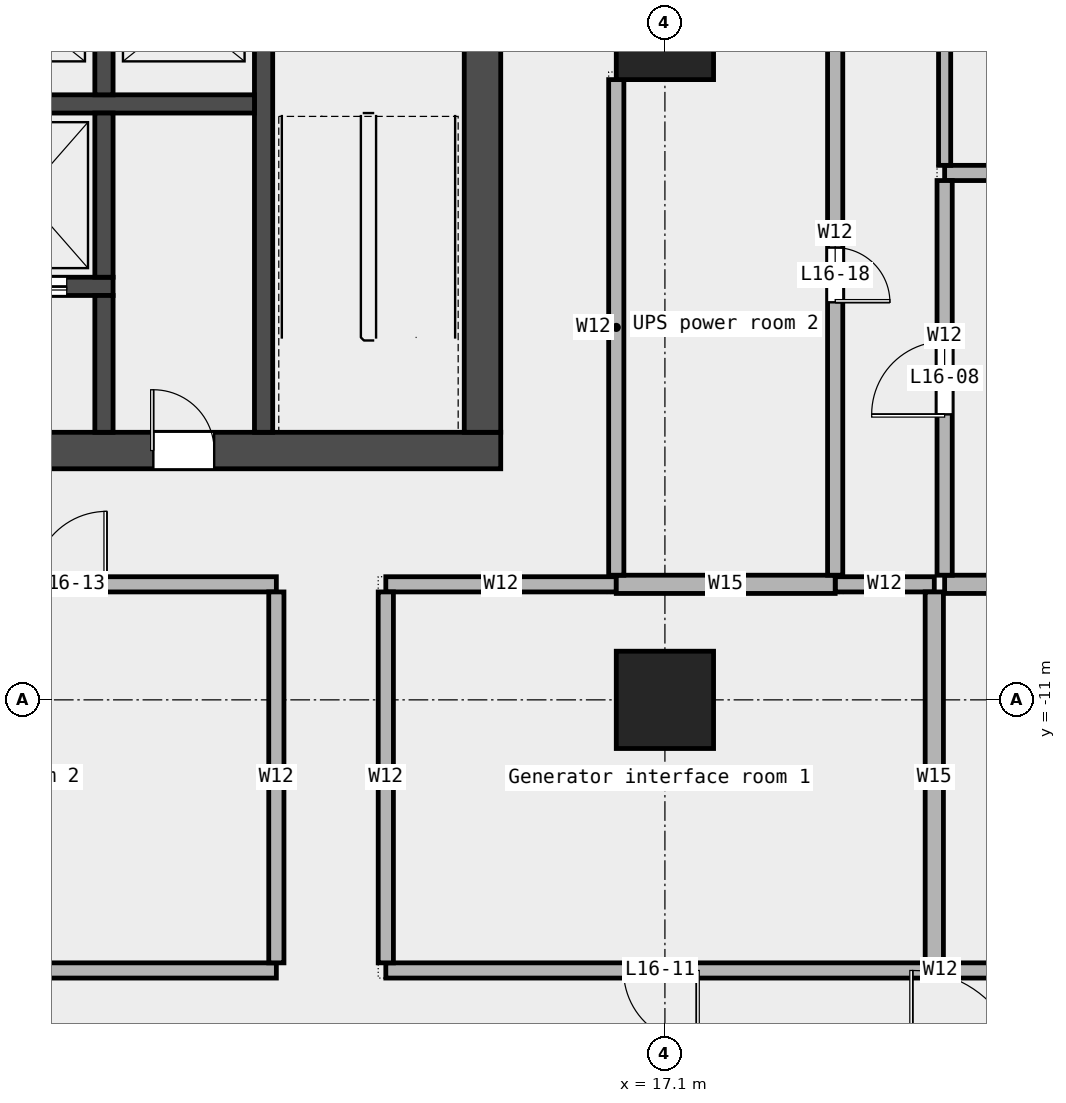
"""IFC4 building model, lengths in metres.
Left out: names, types, materials, properties, quantities, classifications, styles, units other than length and angle.
Written with IfcOpenShell. Run it as: python <this file> out.ifc"""

import sys

from ifc_helpers import new_model, si_unit, direction, frame, frame_2d, origin, origin_2d, place, context, subcontext, project, spatial, rectangle, extrude, element, fill, save


model = new_model("IFC4")
c1 = context("Model", 3, precision=1e-05, world=origin(), true_north=direction((0.0, 1.0)))
c2 = subcontext(c1, "Body", "Model", "MODEL_VIEW")
j1 = project(units=[si_unit("LENGTHUNIT", "METRE"), si_unit("PLANEANGLEUNIT", "RADIAN")], contexts=[c1])
p1 = place(None, origin())
s1 = spatial("IfcSite", under=j1, at=p1, CompositionType="ELEMENT")
p2 = place(p1, origin())
s2 = spatial("IfcBuilding", under=s1, at=p2, CompositionType="ELEMENT")
p3 = place(p2, frame((0.0, 0.0, 83.8)))
s3 = spatial("IfcBuildingStorey", under=s2, at=p3, CompositionType="ELEMENT", Elevation=83.8)
for number, where, z_axis, x_axis in (
    (1, (17.1, -11.0, 0.0), (0.0, 0.0, 1.0), (1.0, 0.0, 0.0)),
    (2, (17.1, 0.0, 0.0), (0.0, 0.0, 1.0), (1.0, 0.0, 0.0)),
):
    element("IfcColumn", number, at=place(p3, frame(where, z_axis=z_axis, x_axis=x_axis)), inside=s3, PredefinedType="COLUMN", context=c2, shape_type="SweptSolid", body=[
        extrude(rectangle(XDim=1.6, YDim=1.6, at=origin_2d()), origin(), (0.0, 0.0, 1.0), 4.2),
    ])
p4 = place(p3, frame((-7.655, -15.45, 0.0), z_axis=(0.0, 0.0, 1.0), x_axis=(1.0, 0.0, 0.0)))
e3 = element("IfcWall", 3, at=p4, inside=s3, PredefinedType="PARTITIONING", context=c2, shape_type="SweptSolid", body=[
    extrude(rectangle(XDim=18.365, YDim=0.25, at=frame_2d((9.183, 0.0))), origin(), (0.0, 0.0, 1.0), 4.2),
])
p5 = place(p3, frame((12.51, -15.45, 0.0), z_axis=(0.0, 0.0, 1.0), x_axis=(1.0, 0.0, 0.0)))
e4 = element("IfcWall", 4, at=p5, inside=s3, PredefinedType="PARTITIONING", context=c2, shape_type="SweptSolid", body=[
    extrude(rectangle(XDim=18.24, YDim=0.25, at=frame_2d((9.12, 0.0))), origin(), (0.0, 0.0, 1.0), 4.2),
])
p6 = place(p5, frame((12.93, 0.0, 0.0)))
e5 = element("IfcOpeningElement", 5, at=p6, cuts=e4, PredefinedType="OPENING", context=c2, shape_type="SweptSolid", body=[
    extrude(rectangle(XDim=1.2, YDim=2.1, at=frame_2d((0.6, 1.05))), frame((0.0, 0.137, 0.0), z_axis=(0.0, -1.0, 0.0), x_axis=(1.0, 0.0, 0.0)), (0.0, 0.0, 1.0), 0.274),
])
p7 = place(p5, frame((3.91, 0.0, 0.0)))
e6 = element("IfcOpeningElement", 6, at=p7, cuts=e4, PredefinedType="OPENING", context=c2, shape_type="SweptSolid", body=[
    extrude(rectangle(XDim=1.2, YDim=2.1, at=frame_2d((0.6, 1.05))), frame((0.0, 0.137, 0.0), z_axis=(0.0, -1.0, 0.0), x_axis=(1.0, 0.0, 0.0)), (0.0, 0.0, 1.0), 0.274),
])
p8 = place(p3, frame((-7.655, -9.1, 0.0), z_axis=(0.0, 0.0, 1.0), x_axis=(1.0, 0.0, 0.0)))
e7 = element("IfcWall", 7, at=p8, inside=s3, PredefinedType="PARTITIONING", context=c2, shape_type="SweptSolid", body=[
    extrude(rectangle(XDim=18.365, YDim=0.25, at=frame_2d((9.183, 0.0))), origin(), (0.0, 0.0, 1.0), 4.2),
])
p9 = place(p8, frame((3.992, 0.0, 0.0)))
e8 = element("IfcOpeningElement", 8, at=p9, cuts=e7, PredefinedType="OPENING", context=c2, shape_type="SweptSolid", body=[
    extrude(rectangle(XDim=1.2, YDim=2.1, at=frame_2d((0.6, 1.05))), frame((0.0, 0.137, 0.0), z_axis=(0.0, -1.0, 0.0), x_axis=(1.0, 0.0, 0.0)), (0.0, 0.0, 1.0), 0.274),
])
p10 = place(p8, frame((14.375, 0.0, 0.0)))
e9 = element("IfcOpeningElement", 9, at=p10, cuts=e7, PredefinedType="OPENING", context=c2, shape_type="SweptSolid", body=[
    extrude(rectangle(XDim=1.2, YDim=2.1, at=frame_2d((0.6, 1.05))), frame((0.0, 0.137, 0.0), z_axis=(0.0, -1.0, 0.0), x_axis=(1.0, 0.0, 0.0)), (0.0, 0.0, 1.0), 0.274),
])
p11 = place(p3, frame((12.51, -9.1, 0.0), z_axis=(0.0, 0.0, 1.0), x_axis=(1.0, 0.0, 0.0)))
e10 = element("IfcWall", 10, at=p11, inside=s3, PredefinedType="PARTITIONING", context=c2, shape_type="SweptSolid", body=[
    extrude(rectangle(XDim=3.79, YDim=0.25, at=frame_2d((1.895, 0.0))), origin(), (0.0, 0.0, 1.0), 4.2),
])
p12 = place(p3, frame((19.9, -9.1, 0.0), z_axis=(0.0, 0.0, 1.0), x_axis=(1.0, 0.0, 0.0)))
e11 = element("IfcWall", 11, at=p12, inside=s3, PredefinedType="PARTITIONING", context=c2, shape_type="SweptSolid", body=[
    extrude(rectangle(XDim=1.63, YDim=0.25, at=frame_2d((0.815, 0.0))), origin(), (0.0, 0.0, 1.0), 4.2),
])
p13 = place(p3, frame((16.3, -9.1, 0.0), z_axis=(0.0, 0.0, 1.0), x_axis=(1.0, 0.0, 0.0)))
e12 = element("IfcWall", 12, at=p13, inside=s3, PredefinedType="PARTITIONING", context=c2, shape_type="SweptSolid", body=[
    extrude(rectangle(XDim=3.6, YDim=0.3, at=frame_2d((1.8, 0.0))), origin(), (0.0, 0.0, 1.0), 4.2),
])
p14 = place(p3, frame((21.7, -9.1, 0.0), z_axis=(0.0, 0.0, 1.0), x_axis=(1.0, 0.0, 0.0)))
e13 = element("IfcWall", 13, at=p14, inside=s3, PredefinedType="PARTITIONING", context=c2, shape_type="SweptSolid", body=[
    extrude(rectangle(XDim=9.05, YDim=0.3, at=frame_2d((4.525, 0.0))), origin(), (0.0, 0.0, 1.0), 4.2),
])
p15 = place(p3, frame((21.7, -2.335, 0.0), z_axis=(0.0, 0.0, 1.0), x_axis=(1.0, 0.0, 0.0)))
e14 = element("IfcWall", 14, at=p15, inside=s3, PredefinedType="PARTITIONING", context=c2, shape_type="SweptSolid", body=[
    extrude(rectangle(XDim=7.05, YDim=0.25, at=frame_2d((3.525, 0.0))), origin(), (0.0, 0.0, 1.0), 4.2),
])
for number, where, z_axis, x_axis in (
    (15, (10.71, -15.325, 0.0), (0.0, 0.0, 1.0), (0.0, 1.0, 0.0)),
    (16, (12.51, -15.325, 0.0), (0.0, 0.0, 1.0), (0.0, 1.0, 0.0)),
):
    element("IfcWall", number, at=place(p3, frame(where, z_axis=z_axis, x_axis=x_axis)), inside=s3, PredefinedType="PARTITIONING", context=c2, shape_type="SweptSolid", body=[
        extrude(rectangle(XDim=6.1, YDim=0.25, at=frame_2d((3.05, 0.0))), origin(), (0.0, 0.0, 1.0), 4.2),
    ])
p16 = place(p3, frame((16.3, -8.95, 0.0), z_axis=(0.0, 0.0, 1.0), x_axis=(0.0, 1.0, 0.0)))
e17 = element("IfcWall", 17, at=p16, inside=s3, PredefinedType="PARTITIONING", context=c2, shape_type="SweptSolid", body=[
    extrude(rectangle(XDim=8.15, YDim=0.25, at=frame_2d((4.075, 0.0))), origin(), (0.0, 0.0, 1.0), 4.2),
])
p17 = place(p3, frame((19.9, -8.95, 0.0), z_axis=(0.0, 0.0, 1.0), x_axis=(0.0, 1.0, 0.0)))
e18 = element("IfcWall", 18, at=p17, inside=s3, PredefinedType="PARTITIONING", context=c2, shape_type="SweptSolid", body=[
    extrude(rectangle(XDim=9.875, YDim=0.25, at=frame_2d((4.938, 0.0))), origin(), (0.0, 0.0, 1.0), 4.2),
])
p18 = place(p17, frame((4.488, 0.0, 0.0)))
e19 = element("IfcOpeningElement", 19, at=p18, cuts=e18, PredefinedType="OPENING", context=c2, shape_type="SweptSolid", body=[
    extrude(rectangle(XDim=0.9, YDim=2.1, at=frame_2d((0.45, 1.05))), frame((0.0, 0.137, 0.0), z_axis=(0.0, -1.0, 0.0), x_axis=(1.0, 0.0, 0.0)), (0.0, 0.0, 1.0), 0.274),
])
p19 = place(p3, frame((21.53, -15.325, 0.0), z_axis=(0.0, 0.0, 1.0), x_axis=(0.0, 1.0, 0.0)))
e20 = element("IfcWall", 20, at=p19, inside=s3, PredefinedType="PARTITIONING", context=c2, shape_type="SweptSolid", body=[
    extrude(rectangle(XDim=6.1, YDim=0.3, at=frame_2d((3.05, 0.0))), origin(), (0.0, 0.0, 1.0), 4.2),
])
p20 = place(p3, frame((21.7, -2.21, 0.0), z_axis=(0.0, 0.0, 1.0), x_axis=(0.0, 1.0, 0.0)))
e21 = element("IfcWall", 21, at=p20, inside=s3, PredefinedType="PARTITIONING", context=c2, shape_type="SweptSolid", body=[
    extrude(rectangle(XDim=17.485, YDim=0.2, at=frame_2d((8.742, 0.0))), origin(), (0.0, 0.0, 1.0), 4.2),
])
p21 = place(p20, frame((15.23, 0.0, 0.0)))
e22 = element("IfcOpeningElement", 22, at=p21, cuts=e21, PredefinedType="OPENING", context=c2, shape_type="SweptSolid", body=[
    extrude(rectangle(XDim=0.9, YDim=2.1, at=frame_2d((0.45, 1.05))), frame((0.0, 0.112, 0.0), z_axis=(0.0, -1.0, 0.0), x_axis=(1.0, 0.0, 0.0)), (0.0, 0.0, 1.0), 0.224),
])
p22 = place(p20, frame((6.188, 0.0, 0.0)))
e23 = element("IfcOpeningElement", 23, at=p22, cuts=e21, PredefinedType="OPENING", context=c2, shape_type="SweptSolid", body=[
    extrude(rectangle(XDim=1.5, YDim=2.1, at=frame_2d((0.75, 1.05))), frame((0.0, 0.112, 0.0), z_axis=(0.0, -1.0, 0.0), x_axis=(1.0, 0.0, 0.0)), (0.0, 0.0, 1.0), 0.224),
])
p23 = place(p3, frame((21.7, -8.95, 0.0), z_axis=(0.0, 0.0, 1.0), x_axis=(0.0, 1.0, 0.0)))
e24 = element("IfcWall", 24, at=p23, inside=s3, PredefinedType="PARTITIONING", context=c2, shape_type="SweptSolid", body=[
    extrude(rectangle(XDim=6.49, YDim=0.25, at=frame_2d((3.245, 0.0))), origin(), (0.0, 0.0, 1.0), 4.2),
])
p24 = place(p23, frame((2.645, 0.0, 0.0)))
e25 = element("IfcOpeningElement", 25, at=p24, cuts=e24, PredefinedType="OPENING", context=c2, shape_type="SweptSolid", body=[
    extrude(rectangle(XDim=1.2, YDim=2.1, at=frame_2d((0.6, 1.05))), frame((0.0, 0.137, 0.0), z_axis=(0.0, -1.0, 0.0), x_axis=(1.0, 0.0, 0.0)), (0.0, 0.0, 1.0), 0.274),
])
p25 = place(p3, frame((-14.4, -6.9, 0.0), z_axis=(0.0, 0.0, 1.0), x_axis=(1.0, 0.0, 0.0)))
e26 = element("IfcWall", 26, at=p25, inside=s3, PredefinedType="SHEAR", context=c2, shape_type="SweptSolid", body=[
    extrude(rectangle(XDim=28.8, YDim=0.6, at=frame_2d((14.4, 0.0))), origin(), (0.0, 0.0, 1.0), 4.5),
])
p26 = place(p25, frame((6.675, 0.0, 0.0)))
e27 = element("IfcOpeningElement", 27, at=p26, cuts=e26, PredefinedType="OPENING", context=c2, shape_type="SweptSolid", body=[
    extrude(rectangle(XDim=1.2, YDim=2.1, at=frame_2d((0.6, 1.05))), frame((0.0, 0.312, 0.0), z_axis=(0.0, -1.0, 0.0), x_axis=(1.0, 0.0, 0.0)), (0.0, 0.0, 1.0), 0.624),
])
p27 = place(p25, frame((11.837, 0.0, 0.0)))
e28 = element("IfcOpeningElement", 28, at=p27, cuts=e26, PredefinedType="OPENING", context=c2, shape_type="SweptSolid", body=[
    extrude(rectangle(XDim=1.0, YDim=2.1, at=frame_2d((0.5, 1.05))), frame((0.0, 0.312, 0.0), z_axis=(0.0, -1.0, 0.0), x_axis=(1.0, 0.0, 0.0)), (0.0, 0.0, 1.0), 0.624),
])
p28 = place(p25, frame((15.025, 0.0, 0.0)))
e29 = element("IfcOpeningElement", 29, at=p28, cuts=e26, PredefinedType="OPENING", context=c2, shape_type="SweptSolid", body=[
    extrude(rectangle(XDim=1.0, YDim=2.1, at=frame_2d((0.5, 1.05))), frame((0.0, 0.312, 0.0), z_axis=(0.0, -1.0, 0.0), x_axis=(1.0, 0.0, 0.0)), (0.0, 0.0, 1.0), 0.624),
])
p29 = place(p25, frame((18.75, 0.0, 0.0)))
e30 = element("IfcOpeningElement", 30, at=p29, cuts=e26, PredefinedType="OPENING", context=c2, shape_type="SweptSolid", body=[
    extrude(rectangle(XDim=1.8, YDim=2.1, at=frame_2d((0.9, 1.05))), frame((0.0, 0.312, 0.0), z_axis=(0.0, -1.0, 0.0), x_axis=(1.0, 0.0, 0.0)), (0.0, 0.0, 1.0), 0.624),
])
p30 = place(p25, frame((23.087, 0.0, 0.0)))
e31 = element("IfcOpeningElement", 31, at=p30, cuts=e26, PredefinedType="OPENING", context=c2, shape_type="SweptSolid", body=[
    extrude(rectangle(XDim=1.0, YDim=2.1, at=frame_2d((0.5, 1.05))), frame((0.0, 0.312, 0.0), z_axis=(0.0, -1.0, 0.0), x_axis=(1.0, 0.0, 0.0)), (0.0, 0.0, 1.0), 0.624),
])
p31 = place(p3, frame((14.1, -6.6, 0.0), z_axis=(0.0, 0.0, 1.0), x_axis=(0.0, 1.0, 0.0)))
e32 = element("IfcWall", 32, at=p31, inside=s3, PredefinedType="SHEAR", context=c2, shape_type="SweptSolid", body=[
    extrude(rectangle(XDim=19.5, YDim=0.6, at=frame_2d((9.75, 0.0))), origin(), (0.0, 0.0, 1.0), 4.5),
])
p32 = place(p31, frame((9.3, 0.0, 0.0)))
e33 = element("IfcOpeningElement", 33, at=p32, cuts=e32, PredefinedType="OPENING", context=c2, shape_type="SweptSolid", body=[
    extrude(rectangle(XDim=1.8, YDim=2.1, at=frame_2d((0.9, 1.05))), frame((0.0, 0.312, 0.0), z_axis=(0.0, -1.0, 0.0), x_axis=(1.0, 0.0, 0.0)), (0.0, 0.0, 1.0), 0.624),
])
p33 = place(p3, frame((10.5, -6.6, 0.0), z_axis=(0.0, 0.0, 1.0), x_axis=(0.0, 1.0, 0.0)))
e34 = element("IfcWall", 34, at=p33, inside=s3, PredefinedType="SHEAR", context=c2, shape_type="SweptSolid", body=[
    extrude(rectangle(XDim=8.55, YDim=0.3, at=frame_2d((4.275, 0.0))), origin(), (0.0, 0.0, 1.0), 4.5),
])
p34 = place(p3, frame((-10.35, -1.2, 0.0), z_axis=(0.0, 0.0, 1.0), x_axis=(1.0, 0.0, 0.0)))
e35 = element("IfcWall", 35, at=p34, inside=s3, PredefinedType="SOLIDWALL", context=c2, shape_type="SweptSolid", body=[
    extrude(rectangle(XDim=20.7, YDim=0.3, at=frame_2d((10.35, 0.0))), origin(), (0.0, 0.0, 1.0), 4.5),
])
p35 = place(p3, frame((7.875, -1.05, 0.0), z_axis=(0.0, 0.0, 1.0), x_axis=(0.0, 1.0, 0.0)))
e36 = element("IfcWall", 36, at=p35, inside=s3, PredefinedType="SOLIDWALL", context=c2, shape_type="SweptSolid", body=[
    extrude(rectangle(XDim=2.7, YDim=0.3, at=frame_2d((1.35, 0.0))), origin(), (0.0, 0.0, 1.0), 4.5),
])
p36 = place(p3, frame((2.475, -4.2, 0.0), z_axis=(0.0, 0.0, 1.0), x_axis=(1.0, 0.0, 0.0)))
e37 = element("IfcWall", 37, at=p36, inside=s3, PredefinedType="SOLIDWALL", context=c2, shape_type="SweptSolid", body=[
    extrude(rectangle(XDim=5.55, YDim=0.3, at=frame_2d((2.775, 0.0))), origin(), (0.0, 0.0, 1.0), 4.5),
])
p37 = place(p36, frame((0.762, 0.0, 0.0)))
e38 = element("IfcOpeningElement", 38, at=p37, cuts=e37, PredefinedType="OPENING", context=c2, shape_type="SweptSolid", body=[
    extrude(rectangle(XDim=1.4, YDim=2.1, at=frame_2d((0.7, 1.05))), frame((0.0, 0.162, 0.0), z_axis=(0.0, -1.0, 0.0), x_axis=(1.0, 0.0, 0.0)), (0.0, 0.0, 1.0), 0.324),
])
p38 = place(p36, frame((3.387, 0.0, 0.0)))
e39 = element("IfcOpeningElement", 39, at=p38, cuts=e37, PredefinedType="OPENING", context=c2, shape_type="SweptSolid", body=[
    extrude(rectangle(XDim=1.4, YDim=2.1, at=frame_2d((0.7, 1.05))), frame((0.0, 0.162, 0.0), z_axis=(0.0, -1.0, 0.0), x_axis=(1.0, 0.0, 0.0)), (0.0, 0.0, 1.0), 0.324),
])
p39 = place(p3, frame((7.875, -4.05, 0.0), z_axis=(0.0, 0.0, 1.0), x_axis=(0.0, 1.0, 0.0)))
e40 = element("IfcWall", 40, at=p39, inside=s3, PredefinedType="SOLIDWALL", context=c2, shape_type="SweptSolid", body=[
    extrude(rectangle(XDim=2.7, YDim=0.3, at=frame_2d((1.35, 0.0))), origin(), (0.0, 0.0, 1.0), 4.5),
])
p40 = place(p3, frame((7.875, -6.6, 0.0), z_axis=(0.0, 0.0, 1.0), x_axis=(0.0, 1.0, 0.0)))
e41 = element("IfcWall", 41, at=p40, inside=s3, PredefinedType="SOLIDWALL", context=c2, shape_type="SweptSolid", body=[
    extrude(rectangle(XDim=2.25, YDim=0.3, at=frame_2d((1.125, 0.0))), origin(), (0.0, 0.0, 1.0), 4.5),
])
p41 = place(p24, origin())
e42 = element("IfcDoor", 42, at=p41, inside=s3, OperationType="SINGLE_SWING_LEFT", PredefinedType="DOOR", context=c2, shape_type="SweptSolid", body=[
    extrude(rectangle(XDim=1.2, YDim=2.1, at=frame_2d((0.6, 1.05))), frame((0.0, 0.025, 0.0), z_axis=(0.0, -1.0, 0.0), x_axis=(1.0, 0.0, 0.0)), (0.0, 0.0, 1.0), 0.05),
])
fill(e25, e42)
p42 = place(p7, origin())
e43 = element("IfcDoor", 43, at=p42, inside=s3, OperationType="SINGLE_SWING_LEFT", PredefinedType="DOOR", context=c2, shape_type="SweptSolid", body=[
    extrude(rectangle(XDim=1.2, YDim=2.1, at=frame_2d((0.6, 1.05))), frame((0.0, 0.025, 0.0), z_axis=(0.0, -1.0, 0.0), x_axis=(1.0, 0.0, 0.0)), (0.0, 0.0, 1.0), 0.05),
])
fill(e6, e43)
p43 = place(p10, origin())
e44 = element("IfcDoor", 44, at=p43, inside=s3, OperationType="SINGLE_SWING_RIGHT", PredefinedType="DOOR", context=c2, shape_type="SweptSolid", body=[
    extrude(rectangle(XDim=1.2, YDim=2.1, at=frame_2d((0.6, 1.05))), frame((0.0, 0.025, 0.0), z_axis=(0.0, -1.0, 0.0), x_axis=(1.0, 0.0, 0.0)), (0.0, 0.0, 1.0), 0.05),
])
fill(e9, e44)
p44 = place(p18, origin())
e45 = element("IfcDoor", 45, at=p44, inside=s3, OperationType="SINGLE_SWING_RIGHT", PredefinedType="DOOR", context=c2, shape_type="SweptSolid", body=[
    extrude(rectangle(XDim=0.9, YDim=2.1, at=frame_2d((0.45, 1.05))), frame((0.0, 0.025, 0.0), z_axis=(0.0, -1.0, 0.0), x_axis=(1.0, 0.0, 0.0)), (0.0, 0.0, 1.0), 0.05),
])
fill(e19, e45)
p45 = place(p38, origin())
e46 = element("IfcDoor", 46, at=p45, inside=s3, OperationType="DOUBLE_DOOR_SLIDING", PredefinedType="DOOR", context=c2, shape_type="SweptSolid", body=[
    extrude(rectangle(XDim=1.4, YDim=2.1, at=frame_2d((0.7, 1.05))), frame((0.0, 0.025, 0.0), z_axis=(0.0, -1.0, 0.0), x_axis=(1.0, 0.0, 0.0)), (0.0, 0.0, 1.0), 0.05),
])
fill(e39, e46)
p46 = place(p30, origin())
e47 = element("IfcDoor", 47, at=p46, inside=s3, OperationType="SINGLE_SWING_LEFT", PredefinedType="DOOR", context=c2, shape_type="SweptSolid", body=[
    extrude(rectangle(XDim=1.0, YDim=2.1, at=frame_2d((0.5, 1.05))), frame((0.0, 0.025, 0.0), z_axis=(0.0, -1.0, 0.0), x_axis=(1.0, 0.0, 0.0)), (0.0, 0.0, 1.0), 0.05),
])
fill(e31, e47)
save(model, sys.argv[1])
